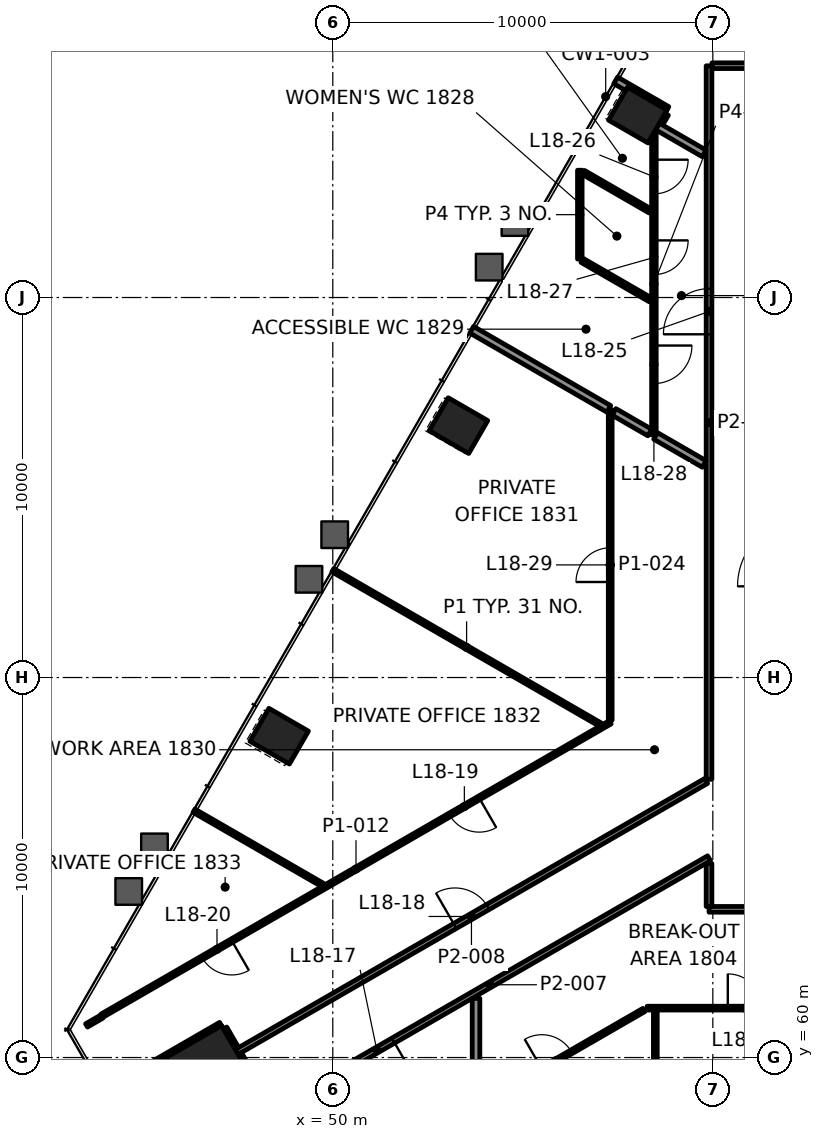
"""IFC4 building model, lengths in metres.
Left out: names, types, materials, properties, quantities, classifications, styles, units other than length and angle.
Written with IfcOpenShell. Run it as: python <this file> out.ifc"""

import sys

from ifc_helpers import new_model, si_unit, direction, frame, frame_2d, origin, origin_2d, place, context, subcontext, project, spatial, rectangle, extrude, element, fill, save


model = new_model("IFC4")
c1 = context("Model", 3, precision=1e-05, world=origin(), true_north=direction((0.0, 1.0)))
c2 = subcontext(c1, "Body", "Model", "MODEL_VIEW")
j1 = project(units=[si_unit("LENGTHUNIT", "METRE"), si_unit("PLANEANGLEUNIT", "RADIAN")], contexts=[c1])
p1 = place(None, origin())
s1 = spatial("IfcSite", under=j1, at=p1, CompositionType="ELEMENT")
p2 = place(p1, origin())
s2 = spatial("IfcBuilding", under=s1, at=p2, CompositionType="ELEMENT")
p3 = place(p2, frame((0.0, 0.0, 82.0)))
s3 = spatial("IfcBuildingStorey", under=s2, at=p3, CompositionType="ELEMENT", Elevation=82.0)
p4 = place(p3, frame((46.45, 58.517, 0.0), z_axis=(0.0, 0.0, 1.0), x_axis=(0.5, -0.866025403784, 0.0)))
e1 = element("IfcColumn", 1, at=p4, inside=s3, PredefinedType="COLUMN", context=c2, shape_type="SweptSolid", body=[
    extrude(rectangle(XDim=3.4, YDim=3.4, at=origin_2d()), origin(), (0.0, 0.0, 1.0), 4.2),
])
for number, where, z_axis, x_axis in (
    (2, (58.025, 84.8, -0.0), (0.0, 0.0, 1.0), (-0.5, -0.866, 0.0)),
    (3, (53.307, 76.628, -0.0), (0.0, 0.0, 1.0), (-0.5, -0.866, 0.0)),
    (4, (48.589, 68.457, -0.0), (0.0, 0.0, 1.0), (-0.5, -0.866, 0.0)),
):
    element("IfcColumn", number, at=place(p3, frame(where, z_axis=z_axis, x_axis=x_axis)), inside=s3, PredefinedType="COLUMN", context=c2, shape_type="SweptSolid", body=[
        extrude(rectangle(XDim=1.0, YDim=1.2, at=origin_2d()), origin(), (0.0, 0.0, 1.0), 4.2),
    ])
p5 = place(p3, frame((58.271, 61.3, 0.0), z_axis=(0.0, 0.0, 1.0), x_axis=(1.0, 0.0, 0.0)))
e5 = element("IfcWall", 5, at=p5, inside=s3, PredefinedType="PARTITIONING", context=c2, shape_type="SweptSolid", body=[
    extrude(rectangle(XDim=14.37, YDim=0.1, at=frame_2d((7.185, 0.0))), origin(), (0.0, 0.0, 1.0), 3.4),
])
p6 = place(p5, frame((2.123, 0.0, 0.0)))
e6 = element("IfcOpeningElement", 6, at=p6, cuts=e5, PredefinedType="OPENING", context=c2, shape_type="SweptSolid", body=[
    extrude(rectangle(XDim=0.9, YDim=2.1, at=frame_2d((0.45, 1.05))), frame((0.0, 0.06, 0.0), z_axis=(0.0, -1.0, 0.0), x_axis=(1.0, 0.0, 0.0)), (0.0, 0.0, 1.0), 0.12),
])
p7 = place(p5, frame((9.052, 0.0, 0.0)))
e7 = element("IfcOpeningElement", 7, at=p7, cuts=e5, PredefinedType="OPENING", context=c2, shape_type="SweptSolid", body=[
    extrude(rectangle(XDim=1.0, YDim=2.1, at=frame_2d((0.5, 1.05))), frame((0.0, 0.06, 0.0), z_axis=(0.0, -1.0, 0.0), x_axis=(1.0, 0.0, 0.0)), (0.0, 0.0, 1.0), 0.12),
])
p8 = place(p3, frame((90.1, 63.9, 0.0), z_axis=(0.0, 0.0, 1.0), x_axis=(-1.0, 0.0, 0.0)))
e8 = element("IfcWall", 8, at=p8, inside=s3, PredefinedType="PARTITIONING", context=c2, shape_type="SweptSolid", body=[
    extrude(rectangle(XDim=30.2, YDim=0.15, at=frame_2d((15.1, 0.0))), origin(), (0.0, 0.0, 1.0), 3.4),
])
p9 = place(p8, frame((4.792, 0.0, 0.0)))
e9 = element("IfcOpeningElement", 9, at=p9, cuts=e8, PredefinedType="OPENING", context=c2, shape_type="SweptSolid", body=[
    extrude(rectangle(XDim=1.0, YDim=2.1, at=frame_2d((0.5, 1.05))), frame((0.0, 0.085, 0.0), z_axis=(0.0, -1.0, 0.0), x_axis=(1.0, 0.0, 0.0)), (0.0, 0.0, 1.0), 0.17),
])
p10 = place(p8, frame((11.111, 0.0, 0.0)))
e10 = element("IfcOpeningElement", 10, at=p10, cuts=e8, PredefinedType="OPENING", context=c2, shape_type="SweptSolid", body=[
    extrude(rectangle(XDim=0.9, YDim=2.1, at=frame_2d((0.45, 1.05))), frame((0.0, 0.085, 0.0), z_axis=(0.0, -1.0, 0.0), x_axis=(1.0, 0.0, 0.0)), (0.0, 0.0, 1.0), 0.17),
])
p11 = place(p8, frame((13.47, 0.0, 0.0)))
e11 = element("IfcOpeningElement", 11, at=p11, cuts=e8, PredefinedType="OPENING", context=c2, shape_type="SweptSolid", body=[
    extrude(rectangle(XDim=0.9, YDim=2.1, at=frame_2d((0.45, 1.05))), frame((0.0, 0.085, 0.0), z_axis=(0.0, -1.0, 0.0), x_axis=(1.0, 0.0, 0.0)), (0.0, 0.0, 1.0), 0.17),
])
p12 = place(p8, frame((15.83, 0.0, 0.0)))
e12 = element("IfcOpeningElement", 12, at=p12, cuts=e8, PredefinedType="OPENING", context=c2, shape_type="SweptSolid", body=[
    extrude(rectangle(XDim=0.9, YDim=2.1, at=frame_2d((0.45, 1.05))), frame((0.0, 0.085, 0.0), z_axis=(0.0, -1.0, 0.0), x_axis=(1.0, 0.0, 0.0)), (0.0, 0.0, 1.0), 0.17),
])
p13 = place(p8, frame((21.677, 0.0, 0.0)))
e13 = element("IfcOpeningElement", 13, at=p13, cuts=e8, PredefinedType="OPENING", context=c2, shape_type="SweptSolid", body=[
    extrude(rectangle(XDim=1.0, YDim=2.1, at=frame_2d((0.5, 1.05))), frame((0.0, 0.085, 0.0), z_axis=(0.0, -1.0, 0.0), x_axis=(1.0, 0.0, 0.0)), (0.0, 0.0, 1.0), 0.17),
])
p14 = place(p8, frame((27.946, 0.0, 0.0)))
e14 = element("IfcOpeningElement", 14, at=p14, cuts=e8, PredefinedType="OPENING", context=c2, shape_type="SweptSolid", body=[
    extrude(rectangle(XDim=1.0, YDim=2.1, at=frame_2d((0.5, 1.05))), frame((0.0, 0.085, 0.0), z_axis=(0.0, -1.0, 0.0), x_axis=(1.0, 0.0, 0.0)), (0.0, 0.0, 1.0), 0.17),
])
p15 = place(p3, frame((59.978, 86.1, 0.0), z_axis=(0.0, 0.0, 1.0), x_axis=(1.0, 0.0, 0.0)))
e15 = element("IfcWall", 15, at=p15, inside=s3, PredefinedType="PARTITIONING", context=c2, shape_type="SweptSolid", body=[
    extrude(rectangle(XDim=9.647, YDim=0.15, at=frame_2d((4.823, 0.0))), origin(), (0.0, 0.0, 1.0), 3.4),
])
p16 = place(p15, frame((4.323, 0.0, 0.0)))
e16 = element("IfcOpeningElement", 16, at=p16, cuts=e15, PredefinedType="OPENING", context=c2, shape_type="SweptSolid", body=[
    extrude(rectangle(XDim=1.0, YDim=2.1, at=frame_2d((0.5, 1.05))), frame((0.0, 0.085, 0.0), z_axis=(0.0, -1.0, 0.0), x_axis=(1.0, 0.0, 0.0)), (0.0, 0.0, 1.0), 0.17),
])
p17 = place(p3, frame((49.885, 56.458, 0.0), z_axis=(0.0, 0.0, 1.0), x_axis=(0.866030313286, 0.499991496398, 0.0)))
e17 = element("IfcWall", 17, at=p17, inside=s3, PredefinedType="PARTITIONING", context=c2, shape_type="SweptSolid", body=[
    extrude(rectangle(XDim=9.583, YDim=0.1, at=frame_2d((4.792, 0.0))), origin(), (0.0, 0.0, 1.0), 3.4),
])
p18 = place(p17, frame((1.892, 0.0, 0.0)))
e18 = element("IfcOpeningElement", 18, at=p18, cuts=e17, PredefinedType="OPENING", context=c2, shape_type="SweptSolid", body=[
    extrude(rectangle(XDim=0.9, YDim=2.1, at=frame_2d((0.45, 1.05))), frame((0.0, 0.06, 0.0), z_axis=(0.0, -1.0, 0.0), x_axis=(1.0, 0.0, 0.0)), (0.0, 0.0, 1.0), 0.12),
])
p19 = place(p17, frame((6.484, 0.0, 0.0)))
e19 = element("IfcOpeningElement", 19, at=p19, cuts=e17, PredefinedType="OPENING", context=c2, shape_type="SweptSolid", body=[
    extrude(rectangle(XDim=0.9, YDim=2.1, at=frame_2d((0.45, 1.05))), frame((0.0, 0.06, 0.0), z_axis=(0.0, -1.0, 0.0), x_axis=(1.0, 0.0, 0.0)), (0.0, 0.0, 1.0), 0.12),
])
p20 = place(p3, frame((59.9, 65.243, 0.0), z_axis=(0.0, 0.0, 1.0), x_axis=(-0.866025527764, -0.499999785261, 0.0)))
e20 = element("IfcWall", 20, at=p20, inside=s3, PredefinedType="PARTITIONING", context=c2, shape_type="SweptSolid", body=[
    extrude(rectangle(XDim=13.31, YDim=0.15, at=frame_2d((6.655, 0.0))), origin(), (0.0, 0.0, 1.0), 3.247),
])
p21 = place(p20, frame((9.594, 0.0, 0.0)))
e21 = element("IfcOpeningElement", 21, at=p21, cuts=e20, PredefinedType="OPENING", context=c2, shape_type="SweptSolid", body=[
    extrude(rectangle(XDim=1.0, YDim=2.1, at=frame_2d((0.5, 1.05))), frame((0.0, 0.085, 0.0), z_axis=(0.0, -1.0, 0.0), x_axis=(1.0, 0.0, 0.0)), (0.0, 0.0, 1.0), 0.17),
])
p22 = place(p3, frame((47.473, 60.146, 0.0), z_axis=(0.0, 0.0, 1.0), x_axis=(0.866025677055, 0.499999526681, 0.0)))
e22 = element("IfcWall", 22, at=p22, inside=s3, PredefinedType="PARTITIONING", context=c2, shape_type="SweptSolid", body=[
    extrude(rectangle(XDim=14.263, YDim=0.15, at=frame_2d((7.132, 0.0))), origin(), (0.0, 0.0, 1.0), 3.4),
])
p23 = place(p22, frame((6.632, 0.0, 0.0)))
e23 = element("IfcOpeningElement", 23, at=p23, cuts=e22, PredefinedType="OPENING", context=c2, shape_type="SweptSolid", body=[
    extrude(rectangle(XDim=1.0, YDim=2.1, at=frame_2d((0.5, 1.05))), frame((0.0, 0.085, 0.0), z_axis=(0.0, -1.0, 0.0), x_axis=(1.0, 0.0, 0.0)), (0.0, 0.0, 1.0), 0.17),
])
p24 = place(p3, frame((43.99, 59.058, 0.0), z_axis=(0.0, 0.0, 1.0), x_axis=(0.866031398331, 0.499989616998, 0.0)))
e24 = element("IfcWall", 24, at=p24, inside=s3, PredefinedType="PARTITIONING", context=c2, shape_type="SweptSolid", body=[
    extrude(rectangle(XDim=3.56, YDim=0.2, at=frame_2d((1.78, 0.0))), origin(), (0.0, 0.0, 1.0), 3.4),
])
p25 = place(p3, frame((43.521, 60.845, 0.0), z_axis=(0.0, 0.0, 1.0), x_axis=(0.865979310119, 0.500079828073, 0.0)))
e25 = element("IfcWall", 25, at=p25, inside=s3, PredefinedType="PARTITIONING", context=c2, shape_type="SweptSolid", body=[
    extrude(rectangle(XDim=0.473, YDim=0.1, at=frame_2d((0.237, 0.0))), origin(), (0.0, 0.0, 1.0), 3.4),
])
p26 = place(p3, frame((57.3, 68.823, 0.0), z_axis=(0.0, 0.0, 1.0), x_axis=(-0.866026891502, -0.499997423189, 0.0)))
e26 = element("IfcWall", 26, at=p26, inside=s3, PredefinedType="PARTITIONING", context=c2, shape_type="SweptSolid", body=[
    extrude(rectangle(XDim=15.448, YDim=0.1, at=frame_2d((7.724, 0.0))), origin(), (0.0, 0.0, 1.0), 3.4),
])
p27 = place(p26, frame((3.982, 0.0, 0.0)))
e27 = element("IfcOpeningElement", 27, at=p27, cuts=e26, PredefinedType="OPENING", context=c2, shape_type="SweptSolid", body=[
    extrude(rectangle(XDim=0.9, YDim=2.1, at=frame_2d((0.45, 1.05))), frame((0.0, 0.06, 0.0), z_axis=(0.0, -1.0, 0.0), x_axis=(1.0, 0.0, 0.0)), (0.0, 0.0, 1.0), 0.12),
])
p28 = place(p26, frame((11.498, 0.0, 0.0)))
e28 = element("IfcOpeningElement", 28, at=p28, cuts=e26, PredefinedType="OPENING", context=c2, shape_type="SweptSolid", body=[
    extrude(rectangle(XDim=0.9, YDim=2.1, at=frame_2d((0.45, 1.05))), frame((0.0, 0.06, 0.0), z_axis=(0.0, -1.0, 0.0), x_axis=(1.0, 0.0, 0.0)), (0.0, 0.0, 1.0), 0.12),
])
p29 = place(p3, frame((58.595, 84.587, 0.0), z_axis=(0.0, 0.0, 1.0), x_axis=(0.499769970942, 0.866158170397, 0.0)))
e29 = element("IfcWall", 29, at=p29, inside=s3, PredefinedType="PARTITIONING", context=c2, shape_type="SweptSolid", body=[
    extrude(rectangle(XDim=0.297, YDim=0.2, at=frame_2d((0.148, 0.0))), origin(), (0.0, 0.0, 1.0), 3.4),
])
p30 = place(p3, frame((59.9, 63.975, 0.0), z_axis=(0.0, 0.0, 1.0), x_axis=(0.0, 1.0, 0.0)))
e30 = element("IfcWall", 30, at=p30, inside=s3, PredefinedType="PARTITIONING", context=c2, shape_type="SweptSolid", body=[
    extrude(rectangle(XDim=1.131, YDim=0.15, at=frame_2d((0.565, 0.0))), origin(), (0.0, 0.0, 1.0), 3.247),
])
p31 = place(p3, frame((59.9, 67.321, 0.0), z_axis=(0.0, 0.0, 1.0), x_axis=(0.0, 1.0, 0.0)))
e31 = element("IfcWall", 31, at=p31, inside=s3, PredefinedType="PARTITIONING", context=c2, shape_type="SweptSolid", body=[
    extrude(rectangle(XDim=18.776, YDim=0.15, at=frame_2d((9.388, 0.0))), origin(), (0.0, 0.0, 1.0), 3.4),
])
p32 = place(p31, frame((11.711, 0.0, 0.0)))
e32 = element("IfcOpeningElement", 32, at=p32, cuts=e31, PredefinedType="OPENING", context=c2, shape_type="SweptSolid", body=[
    extrude(rectangle(XDim=1.2, YDim=2.1, at=frame_2d((0.6, 1.05))), frame((0.0, 0.085, 0.0), z_axis=(0.0, -1.0, 0.0), x_axis=(1.0, 0.0, 0.0)), (0.0, 0.0, 1.0), 0.17),
])
p33 = place(p3, frame((58.487, 54.439, 0.0), z_axis=(0.0, 0.0, 1.0), x_axis=(0.0, 1.0, 0.0)))
e33 = element("IfcWall", 33, at=p33, inside=s3, PredefinedType="PARTITIONING", context=c2, shape_type="SweptSolid", body=[
    extrude(rectangle(XDim=6.811, YDim=0.1, at=frame_2d((3.405, 0.0))), origin(), (0.0, 0.0, 1.0), 3.165),
])
p34 = place(p3, frame((58.45, 84.336, 0.0), z_axis=(0.0, 0.0, 1.0), x_axis=(0.0, -1.0, 0.0)))
e34 = element("IfcWall", 34, at=p34, inside=s3, PredefinedType="PARTITIONING", context=c2, shape_type="SweptSolid", body=[
    extrude(rectangle(XDim=7.953, YDim=0.12, at=frame_2d((3.976, 0.0))), origin(), (0.0, 0.0, 1.0), 3.4),
])
p35 = place(p34, frame((0.709, 0.0, 0.0)))
e35 = element("IfcOpeningElement", 35, at=p35, cuts=e34, PredefinedType="OPENING", context=c2, shape_type="SweptSolid", body=[
    extrude(rectangle(XDim=0.9, YDim=2.1, at=frame_2d((0.45, 1.05))), frame((0.0, 0.07, 0.0), z_axis=(0.0, -1.0, 0.0), x_axis=(1.0, 0.0, 0.0)), (0.0, 0.0, 1.0), 0.14),
])
p36 = place(p34, frame((2.833, 0.0, 0.0)))
e36 = element("IfcOpeningElement", 36, at=p36, cuts=e34, PredefinedType="OPENING", context=c2, shape_type="SweptSolid", body=[
    extrude(rectangle(XDim=0.9, YDim=2.1, at=frame_2d((0.45, 1.05))), frame((0.0, 0.07, 0.0), z_axis=(0.0, -1.0, 0.0), x_axis=(1.0, 0.0, 0.0)), (0.0, 0.0, 1.0), 0.14),
])
p37 = place(p34, frame((5.6, 0.0, 0.0)))
e37 = element("IfcOpeningElement", 37, at=p37, cuts=e34, PredefinedType="OPENING", context=c2, shape_type="SweptSolid", body=[
    extrude(rectangle(XDim=1.0, YDim=2.1, at=frame_2d((0.5, 1.05))), frame((0.0, 0.07, 0.0), z_axis=(0.0, -1.0, 0.0), x_axis=(1.0, 0.0, 0.0)), (0.0, 0.0, 1.0), 0.14),
])
p38 = place(p3, frame((57.3, 68.88, 0.0), z_axis=(0.0, 0.0, 1.0), x_axis=(0.0, 1.0, 0.0)))
e38 = element("IfcWall", 38, at=p38, inside=s3, PredefinedType="PARTITIONING", context=c2, shape_type="SweptSolid", body=[
    extrude(rectangle(XDim=8.167, YDim=0.1, at=frame_2d((4.083, 0.0))), origin(), (0.0, 0.0, 1.0), 3.4),
])
p39 = place(p38, frame((3.634, 0.0, 0.0)))
e39 = element("IfcOpeningElement", 39, at=p39, cuts=e38, PredefinedType="OPENING", context=c2, shape_type="SweptSolid", body=[
    extrude(rectangle(XDim=0.9, YDim=2.1, at=frame_2d((0.45, 1.05))), frame((0.0, 0.06, 0.0), z_axis=(0.0, -1.0, 0.0), x_axis=(1.0, 0.0, 0.0)), (0.0, 0.0, 1.0), 0.12),
])
p40 = place(p3, frame((56.5, 81.011, 0.0), z_axis=(0.0, 0.0, 1.0), x_axis=(0.0, 1.0, 0.0)))
e40 = element("IfcWall", 40, at=p40, inside=s3, PredefinedType="PARTITIONING", context=c2, shape_type="SweptSolid", body=[
    extrude(rectangle(XDim=2.338, YDim=0.12, at=frame_2d((1.169, 0.0))), origin(), (0.0, 0.0, 1.0), 3.165),
])
p41 = place(p3, frame((48.335, 58.653, 0.0), z_axis=(0.0, 0.0, 1.0), x_axis=(-0.499991515992, 0.866030301974, 0.0)))
e41 = element("IfcWall", 41, at=p41, inside=s3, PredefinedType="PARTITIONING", context=c2, shape_type="SweptSolid", body=[
    extrude(rectangle(XDim=1.649, YDim=0.2, at=frame_2d((0.825, 0.0))), origin(), (0.0, 0.0, 1.0), 3.247),
])
p42 = place(p3, frame((58.792, 84.935, 0.0), z_axis=(0.0, 0.0, 1.0), x_axis=(-0.866073306909, 0.499917020175, 0.0)))
e42 = element("IfcWall", 42, at=p42, inside=s3, PredefinedType="PARTITIONING", context=c2, shape_type="SweptSolid", body=[
    extrude(rectangle(XDim=1.557, YDim=0.2, at=frame_2d((0.778, 0.0))), origin(), (0.0, 0.0, 1.0), 3.165),
])
p43 = place(p3, frame((59.773, 83.791, 0.0), z_axis=(0.0, 0.0, 1.0), x_axis=(-0.865999255827, 0.500045286857, 0.0)))
e43 = element("IfcWall", 43, at=p43, inside=s3, PredefinedType="PARTITIONING", context=c2, shape_type="SweptSolid", body=[
    extrude(rectangle(XDim=1.418, YDim=0.2, at=frame_2d((0.709, 0.0))), origin(), (0.0, 0.0, 1.0), 3.4),
])
p44 = place(p3, frame((58.355, 82.275, 0.0), z_axis=(0.0, 0.0, 1.0), x_axis=(-0.866069607179, 0.499923429657, 0.0)))
e44 = element("IfcWall", 44, at=p44, inside=s3, PredefinedType="PARTITIONING", context=c2, shape_type="SweptSolid", body=[
    extrude(rectangle(XDim=2.033, YDim=0.12, at=frame_2d((1.017, 0.0))), origin(), (0.0, 0.0, 1.0), 3.165),
])
p45 = place(p3, frame((58.355, 79.94, 0.0), z_axis=(0.0, 0.0, 1.0), x_axis=(-0.866038486578, 0.499977339252, 0.0)))
e45 = element("IfcWall", 45, at=p45, inside=s3, PredefinedType="PARTITIONING", context=c2, shape_type="SweptSolid", body=[
    extrude(rectangle(XDim=2.073, YDim=0.12, at=frame_2d((1.036, 0.0))), origin(), (0.0, 0.0, 1.0), 3.4),
])
p46 = place(p3, frame((59.773, 75.62, 0.0), z_axis=(0.0, 0.0, 1.0), x_axis=(-0.866056109487, 0.499946812391, 0.0)))
e46 = element("IfcWall", 46, at=p46, inside=s3, PredefinedType="PARTITIONING", context=c2, shape_type="SweptSolid", body=[
    extrude(rectangle(XDim=1.476, YDim=0.2, at=frame_2d((0.738, 0.0))), origin(), (0.0, 0.0, 1.0), 3.4),
])
p47 = place(p3, frame((57.04, 68.76, 0.0), z_axis=(0.0, 0.0, 1.0), x_axis=(-0.866036506983, 0.499980768202, 0.0)))
e47 = element("IfcWall", 47, at=p47, inside=s3, PredefinedType="PARTITIONING", context=c2, shape_type="SweptSolid", body=[
    extrude(rectangle(XDim=8.127, YDim=0.1, at=frame_2d((4.063, 0.0))), origin(), (0.0, 0.0, 1.0), 3.165),
])
p48 = place(p3, frame((49.732, 64.541, 0.0), z_axis=(0.0, 0.0, 1.0), x_axis=(-0.866020177134, 0.500009052715, 0.0)))
e48 = element("IfcWall", 48, at=p48, inside=s3, PredefinedType="PARTITIONING", context=c2, shape_type="SweptSolid", body=[
    extrude(rectangle(XDim=3.908, YDim=0.1, at=frame_2d((1.954, 0.0))), origin(), (0.0, 0.0, 1.0), 3.4),
])
p49 = place(p3, frame((53.769, 58.816, 0.0), z_axis=(0.0, 0.0, 1.0), x_axis=(0.0, 1.0, 0.0)))
e49 = element("IfcWall", 49, at=p49, inside=s3, PredefinedType="PARTITIONING", context=c2, shape_type="SweptSolid", body=[
    extrude(rectangle(XDim=2.74, YDim=0.2, at=frame_2d((1.37, 0.0))), origin(), (0.0, 0.0, 1.0), 3.4),
])
p50 = place(p3, frame((47.435, 60.211, 0.0), z_axis=(0.0, 0.0, 1.0), x_axis=(-0.499801510763, 0.866139971275, 0.0)))
e50 = element("IfcWall", 50, at=p50, inside=s3, PredefinedType="PARTITIONING", context=c2, shape_type="SweptSolid", body=[
    extrude(rectangle(XDim=0.624, YDim=0.2, at=frame_2d((0.312, 0.0))), origin(), (0.0, 0.0, 1.0), 3.4),
])
p51 = place(p3, frame((58.34, 76.447, 0.0), z_axis=(0.0, 0.0, 1.0), x_axis=(-0.866062005839, 0.499936598022, 0.0)))
e51 = element("IfcWall", 51, at=p51, inside=s3, PredefinedType="PARTITIONING", context=c2, shape_type="SweptSolid", body=[
    extrude(rectangle(XDim=1.086, YDim=0.2, at=frame_2d((0.543, 0.0))), origin(), (0.0, 0.0, 1.0), 3.4),
])
p52 = place(p3, frame((57.263, 77.069, 0.0), z_axis=(0.0, 0.0, 1.0), x_axis=(-0.866048944448, 0.499959224157, 0.0)))
e52 = element("IfcWall", 52, at=p52, inside=s3, PredefinedType="PARTITIONING", context=c2, shape_type="SweptSolid", body=[
    extrude(rectangle(XDim=4.165, YDim=0.2, at=frame_2d((2.083, 0.0))), origin(), (0.0, 0.0, 1.0), 3.165),
])
p53 = place(p6, origin())
e53 = element("IfcDoor", 53, at=p53, inside=s3, OperationType="SINGLE_SWING_LEFT", PredefinedType="DOOR", context=c2, shape_type="SweptSolid", body=[
    extrude(rectangle(XDim=0.9, YDim=2.1, at=frame_2d((0.45, 1.05))), frame((0.0, 0.025, 0.0), z_axis=(0.0, -1.0, 0.0), x_axis=(1.0, 0.0, 0.0)), (0.0, 0.0, 1.0), 0.05),
])
fill(e6, e53)
p54 = place(p19, origin())
e54 = element("IfcDoor", 54, at=p54, inside=s3, OperationType="SINGLE_SWING_RIGHT", PredefinedType="DOOR", context=c2, shape_type="SweptSolid", body=[
    extrude(rectangle(XDim=0.9, YDim=2.1, at=frame_2d((0.45, 1.05))), frame((0.0, 0.025, 0.0), z_axis=(0.0, -1.0, 0.0), x_axis=(1.0, 0.0, 0.0)), (0.0, 0.0, 1.0), 0.05),
])
fill(e19, e54)
p55 = place(p21, origin())
e55 = element("IfcDoor", 55, at=p55, inside=s3, OperationType="SINGLE_SWING_RIGHT", PredefinedType="DOOR", context=c2, shape_type="SweptSolid", body=[
    extrude(rectangle(XDim=1.0, YDim=2.1, at=frame_2d((0.5, 1.05))), frame((0.0, 0.025, 0.0), z_axis=(0.0, -1.0, 0.0), x_axis=(1.0, 0.0, 0.0)), (0.0, 0.0, 1.0), 0.05),
])
fill(e21, e55)
p56 = place(p23, origin())
e56 = element("IfcDoor", 56, at=p56, inside=s3, OperationType="SINGLE_SWING_LEFT", PredefinedType="DOOR", context=c2, shape_type="SweptSolid", body=[
    extrude(rectangle(XDim=1.0, YDim=2.1, at=frame_2d((0.5, 1.05))), frame((0.0, 0.025, 0.0), z_axis=(0.0, -1.0, 0.0), x_axis=(1.0, 0.0, 0.0)), (0.0, 0.0, 1.0), 0.05),
])
fill(e23, e56)
p57 = place(p27, origin())
e57 = element("IfcDoor", 57, at=p57, inside=s3, OperationType="SINGLE_SWING_RIGHT", PredefinedType="DOOR", context=c2, shape_type="SweptSolid", body=[
    extrude(rectangle(XDim=0.9, YDim=2.1, at=frame_2d((0.45, 1.05))), frame((0.0, 0.025, 0.0), z_axis=(0.0, -1.0, 0.0), x_axis=(1.0, 0.0, 0.0)), (0.0, 0.0, 1.0), 0.05),
])
fill(e27, e57)
p58 = place(p28, origin())
e58 = element("IfcDoor", 58, at=p58, inside=s3, OperationType="SINGLE_SWING_LEFT", PredefinedType="DOOR", context=c2, shape_type="SweptSolid", body=[
    extrude(rectangle(XDim=0.9, YDim=2.1, at=frame_2d((0.45, 1.05))), frame((0.0, 0.025, 0.0), z_axis=(0.0, -1.0, 0.0), x_axis=(1.0, 0.0, 0.0)), (0.0, 0.0, 1.0), 0.05),
])
fill(e28, e58)
p59 = place(p32, origin())
e59 = element("IfcDoor", 59, at=p59, inside=s3, OperationType="DOUBLE_DOOR_SINGLE_SWING", PredefinedType="DOOR", context=c2, shape_type="SweptSolid", body=[
    extrude(rectangle(XDim=1.2, YDim=2.1, at=frame_2d((0.6, 1.05))), frame((0.0, 0.025, 0.0), z_axis=(0.0, -1.0, 0.0), x_axis=(1.0, 0.0, 0.0)), (0.0, 0.0, 1.0), 0.05),
])
fill(e32, e59)
p60 = place(p35, origin())
e60 = element("IfcDoor", 60, at=p60, inside=s3, OperationType="SINGLE_SWING_LEFT", PredefinedType="DOOR", context=c2, shape_type="SweptSolid", body=[
    extrude(rectangle(XDim=0.9, YDim=2.1, at=frame_2d((0.45, 1.05))), frame((0.0, 0.025, 0.0), z_axis=(0.0, -1.0, 0.0), x_axis=(1.0, 0.0, 0.0)), (0.0, 0.0, 1.0), 0.05),
])
fill(e35, e60)
p61 = place(p36, origin())
e61 = element("IfcDoor", 61, at=p61, inside=s3, OperationType="SINGLE_SWING_RIGHT", PredefinedType="DOOR", context=c2, shape_type="SweptSolid", body=[
    extrude(rectangle(XDim=0.9, YDim=2.1, at=frame_2d((0.45, 1.05))), frame((0.0, 0.025, 0.0), z_axis=(0.0, -1.0, 0.0), x_axis=(1.0, 0.0, 0.0)), (0.0, 0.0, 1.0), 0.05),
])
fill(e36, e61)
p62 = place(p37, origin())
e62 = element("IfcDoor", 62, at=p62, inside=s3, OperationType="SINGLE_SWING_LEFT", PredefinedType="DOOR", context=c2, shape_type="SweptSolid", body=[
    extrude(rectangle(XDim=1.0, YDim=2.1, at=frame_2d((0.5, 1.05))), frame((0.0, 0.025, 0.0), z_axis=(0.0, -1.0, 0.0), x_axis=(1.0, 0.0, 0.0)), (0.0, 0.0, 1.0), 0.05),
])
fill(e37, e62)
p63 = place(p39, origin())
e63 = element("IfcDoor", 63, at=p63, inside=s3, OperationType="SINGLE_SWING_RIGHT", PredefinedType="DOOR", context=c2, shape_type="SweptSolid", body=[
    extrude(rectangle(XDim=0.9, YDim=2.1, at=frame_2d((0.45, 1.05))), frame((0.0, 0.025, 0.0), z_axis=(0.0, -1.0, 0.0), x_axis=(1.0, 0.0, 0.0)), (0.0, 0.0, 1.0), 0.05),
])
fill(e39, e63)
save(model, sys.argv[1])
